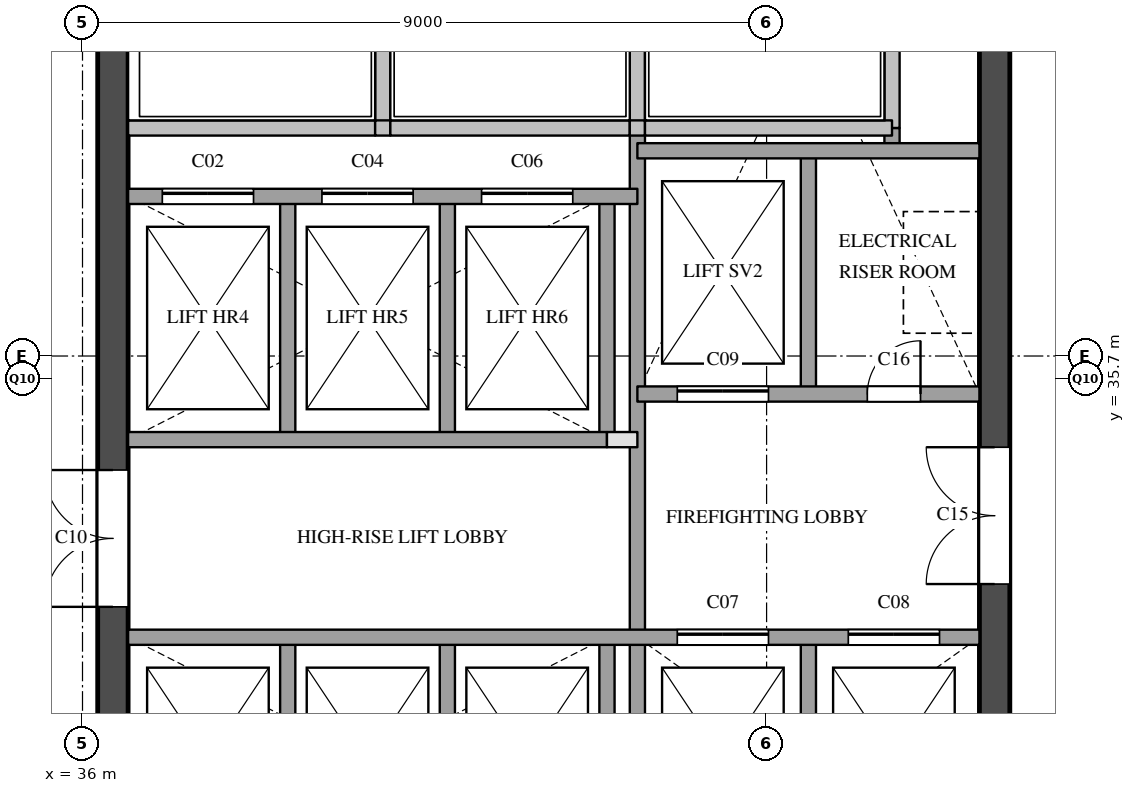
"""IFC4 building model, lengths in metres.
Left out: names, types, materials, properties, quantities, classifications, styles, units other than length and angle.
Written with IfcOpenShell. Run it as: python <this file> out.ifc"""

import sys

from ifc_helpers import new_model, si_unit, direction, frame, frame_2d, origin, place, context, subcontext, project, spatial, rectangle, extrude, element, fill, save


model = new_model("IFC4")
c1 = context("Model", 3, precision=1e-05, world=origin(), true_north=direction((0.0, 1.0)))
c2 = subcontext(c1, "Body", "Model", "MODEL_VIEW")
j1 = project(units=[si_unit("LENGTHUNIT", "METRE"), si_unit("PLANEANGLEUNIT", "RADIAN")], contexts=[c1])
p1 = place(None, origin())
s1 = spatial("IfcSite", under=j1, at=p1, CompositionType="ELEMENT")
p2 = place(p1, origin())
s2 = spatial("IfcBuilding", under=s1, at=p2, CompositionType="ELEMENT")
p3 = place(p2, frame((0.0, 0.0, 250.1)))
s3 = spatial("IfcBuildingStorey", under=s2, at=p3, CompositionType="ELEMENT", Elevation=250.1)
p4 = place(p3, frame((36.4, 29.1, 0.0), z_axis=(0.0, 0.0, 1.0), x_axis=(0.0, 1.0, 0.0)))
e1 = element("IfcWall", 1, at=p4, inside=s3, PredefinedType="SHEAR", context=c2, shape_type="SweptSolid", body=[
    extrude(rectangle(XDim=20.3, YDim=0.4, at=frame_2d((10.15, 0.0))), origin(), (0.0, 0.0, 1.0), 3.6),
])
p5 = place(p4, frame((3.6, 0.0, 0.0)))
e2 = element("IfcOpeningElement", 2, at=p5, cuts=e1, PredefinedType="OPENING", context=c2, shape_type="SweptSolid", body=[
    extrude(rectangle(XDim=1.8, YDim=2.1, at=frame_2d((0.9, 1.05))), frame((0.0, 0.21, 0.0), z_axis=(0.0, -1.0, 0.0), x_axis=(1.0, 0.0, 0.0)), (0.0, 0.0, 1.0), 0.42),
])
p6 = place(p4, frame((16.4, 0.0, 0.0)))
e3 = element("IfcOpeningElement", 3, at=p6, cuts=e1, PredefinedType="OPENING", context=c2, shape_type="SweptSolid", body=[
    extrude(rectangle(XDim=1.0, YDim=2.1, at=frame_2d((0.5, 1.05))), frame((0.0, 0.21, 0.0), z_axis=(0.0, -1.0, 0.0), x_axis=(1.0, 0.0, 0.0)), (0.0, 0.0, 1.0), 0.42),
])
p7 = place(p3, frame((48.0, 29.1, 0.0), z_axis=(0.0, 0.0, 1.0), x_axis=(0.0, 1.0, 0.0)))
e4 = element("IfcWall", 4, at=p7, inside=s3, PredefinedType="SHEAR", context=c2, shape_type="SweptSolid", body=[
    extrude(rectangle(XDim=20.3, YDim=0.4, at=frame_2d((10.15, 0.0))), origin(), (0.0, 0.0, 1.0), 3.6),
])
p8 = place(p7, frame((12.5, 0.0, 0.0)))
e5 = element("IfcOpeningElement", 5, at=p8, cuts=e4, PredefinedType="OPENING", context=c2, shape_type="SweptSolid", body=[
    extrude(rectangle(XDim=0.7, YDim=2.1, at=frame_2d((0.35, 1.05))), frame((0.0, 0.21, 0.0), z_axis=(0.0, -1.0, 0.0), x_axis=(1.0, 0.0, 0.0)), (0.0, 0.0, 1.0), 0.42),
])
p9 = place(p7, frame((3.9, 0.0, 0.0)))
e6 = element("IfcOpeningElement", 6, at=p9, cuts=e4, PredefinedType="OPENING", context=c2, shape_type="SweptSolid", body=[
    extrude(rectangle(XDim=1.8, YDim=2.1, at=frame_2d((0.9, 1.05))), frame((0.0, 0.21, 0.0), z_axis=(0.0, -1.0, 0.0), x_axis=(1.0, 0.0, 0.0)), (0.0, 0.0, 1.0), 0.42),
])
p10 = place(p3, frame((38.7, 29.1, 0.0), z_axis=(0.0, 0.0, 1.0), x_axis=(0.0, 1.0, 0.0)))
e7 = element("IfcWall", 7, at=p10, inside=s3, PredefinedType="SOLIDWALL", context=c2, shape_type="SweptSolid", body=[
    extrude(rectangle(XDim=3.2, YDim=0.2, at=frame_2d((1.6, 0.0))), origin(), (0.0, 0.0, 1.0), 3.6),
])
p11 = place(p3, frame((38.7, 34.9, 0.0), z_axis=(0.0, 0.0, 1.0), x_axis=(0.0, 1.0, 0.0)))
e8 = element("IfcWall", 8, at=p11, inside=s3, PredefinedType="SOLIDWALL", context=c2, shape_type="SweptSolid", body=[
    extrude(rectangle(XDim=3.2, YDim=0.2, at=frame_2d((1.6, 0.0))), origin(), (0.0, 0.0, 1.0), 3.6),
])
p12 = place(p3, frame((39.95, 39.0, 0.0), z_axis=(0.0, 0.0, 1.0), x_axis=(0.0, 1.0, 0.0)))
e9 = element("IfcWall", 9, at=p12, inside=s3, PredefinedType="SOLIDWALL", context=c2, shape_type="SweptSolid", body=[
    extrude(rectangle(XDim=1.78, YDim=0.2, at=frame_2d((0.89, 0.0))), origin(), (0.0, 0.0, 1.0), 3.6),
])
p13 = place(p3, frame((40.8, 29.1, 0.0), z_axis=(0.0, 0.0, 1.0), x_axis=(0.0, 1.0, 0.0)))
e10 = element("IfcWall", 10, at=p13, inside=s3, PredefinedType="SOLIDWALL", context=c2, shape_type="SweptSolid", body=[
    extrude(rectangle(XDim=3.2, YDim=0.2, at=frame_2d((1.6, 0.0))), origin(), (0.0, 0.0, 1.0), 3.6),
])
p14 = place(p3, frame((40.8, 34.9, 0.0), z_axis=(0.0, 0.0, 1.0), x_axis=(0.0, 1.0, 0.0)))
e11 = element("IfcWall", 11, at=p14, inside=s3, PredefinedType="SOLIDWALL", context=c2, shape_type="SweptSolid", body=[
    extrude(rectangle(XDim=3.2, YDim=0.2, at=frame_2d((1.6, 0.0))), origin(), (0.0, 0.0, 1.0), 3.6),
])
p15 = place(p3, frame((42.9, 29.1, 0.0), z_axis=(0.0, 0.0, 1.0), x_axis=(0.0, 1.0, 0.0)))
e12 = element("IfcWall", 12, at=p15, inside=s3, PredefinedType="SOLIDWALL", context=c2, shape_type="SweptSolid", body=[
    extrude(rectangle(XDim=3.2, YDim=0.2, at=frame_2d((1.6, 0.0))), origin(), (0.0, 0.0, 1.0), 3.6),
])
p16 = place(p3, frame((42.9, 34.9, 0.0), z_axis=(0.0, 0.0, 1.0), x_axis=(0.0, 1.0, 0.0)))
e13 = element("IfcWall", 13, at=p16, inside=s3, PredefinedType="SOLIDWALL", context=c2, shape_type="SweptSolid", body=[
    extrude(rectangle(XDim=3.2, YDim=0.2, at=frame_2d((1.6, 0.0))), origin(), (0.0, 0.0, 1.0), 3.6),
])
p17 = place(p3, frame((43.3, 29.1, 0.0), z_axis=(0.0, 0.0, 1.0), x_axis=(0.0, 1.0, 0.0)))
e14 = element("IfcWall", 14, at=p17, inside=s3, PredefinedType="SOLIDWALL", context=c2, shape_type="SweptSolid", body=[
    extrude(rectangle(XDim=9.9, YDim=0.2, at=frame_2d((4.95, 0.0))), origin(), (0.0, 0.0, 1.0), 3.6),
])
p18 = place(p3, frame((43.3, 39.0, 0.0), z_axis=(0.0, 0.0, 1.0), x_axis=(0.0, 1.0, 0.0)))
e15 = element("IfcWall", 15, at=p18, inside=s3, PredefinedType="SOLIDWALL", context=c2, shape_type="SweptSolid", body=[
    extrude(rectangle(XDim=1.78, YDim=0.2, at=frame_2d((0.89, 0.0))), origin(), (0.0, 0.0, 1.0), 3.6),
])
for number, where, z_axis, x_axis in (
    (16, (45.55, 29.1, 0.0), (0.0, 0.0, 1.0), (0.0, 1.0, 0.0)),
    (17, (45.55, 35.5, 0.0), (0.0, 0.0, 1.0), (0.0, 1.0, 0.0)),
):
    element("IfcWall", number, at=place(p3, frame(where, z_axis=z_axis, x_axis=x_axis)), inside=s3, PredefinedType="SOLIDWALL", context=c2, shape_type="SweptSolid", body=[
        extrude(rectangle(XDim=3.2, YDim=0.2, at=frame_2d((1.6, 0.0))), origin(), (0.0, 0.0, 1.0), 3.6),
    ])
p19 = place(p3, frame((46.65, 38.7, 0.0), z_axis=(0.0, 0.0, 1.0), x_axis=(0.0, 1.0, 0.0)))
e18 = element("IfcWall", 18, at=p19, inside=s3, PredefinedType="SOLIDWALL", context=c2, shape_type="SweptSolid", body=[
    extrude(rectangle(XDim=0.3, YDim=0.2, at=frame_2d((0.15, 0.0))), origin(), (0.0, 0.0, 1.0), 3.6),
])
p20 = place(p3, frame((46.65, 39.0, 0.0), z_axis=(0.0, 0.0, 1.0), x_axis=(0.0, 1.0, 0.0)))
e19 = element("IfcWall", 19, at=p20, inside=s3, PredefinedType="SOLIDWALL", context=c2, shape_type="SweptSolid", body=[
    extrude(rectangle(XDim=1.78, YDim=0.2, at=frame_2d((0.89, 0.0))), origin(), (0.0, 0.0, 1.0), 3.6),
])
p21 = place(p3, frame((36.6, 32.3, 0.0), z_axis=(0.0, 0.0, 1.0), x_axis=(1.0, 0.0, 0.0)))
e20 = element("IfcWall", 20, at=p21, inside=s3, PredefinedType="SOLIDWALL", context=c2, shape_type="SweptSolid", body=[
    extrude(rectangle(XDim=11.2, YDim=0.2, at=frame_2d((5.6, 0.0))), origin(), (0.0, 0.0, 1.0), 3.6),
])
p22 = place(p21, frame((7.225, 0.0, 0.0)))
e21 = element("IfcOpeningElement", 21, at=p22, cuts=e20, PredefinedType="OPENING", context=c2, shape_type="SweptSolid", body=[
    extrude(rectangle(XDim=1.2, YDim=2.1, at=frame_2d((0.6, 1.05))), frame((0.0, 0.11, 0.0), z_axis=(0.0, -1.0, 0.0), x_axis=(1.0, 0.0, 0.0)), (0.0, 0.0, 1.0), 0.22),
])
p23 = place(p21, frame((9.475, 0.0, 0.0)))
e22 = element("IfcOpeningElement", 22, at=p23, cuts=e20, PredefinedType="OPENING", context=c2, shape_type="SweptSolid", body=[
    extrude(rectangle(XDim=1.2, YDim=2.1, at=frame_2d((0.6, 1.05))), frame((0.0, 0.11, 0.0), z_axis=(0.0, -1.0, 0.0), x_axis=(1.0, 0.0, 0.0)), (0.0, 0.0, 1.0), 0.22),
])
p24 = place(p3, frame((42.9, 34.9, 0.0), z_axis=(0.0, 0.0, 1.0), x_axis=(1.0, 0.0, 0.0)))
e23 = element("IfcWall", 23, at=p24, inside=s3, PredefinedType="PARTITIONING", context=c2, shape_type="SweptSolid", body=[
    extrude(rectangle(XDim=0.4, YDim=0.2, at=frame_2d((0.2, 0.0))), origin(), (0.0, 0.0, 1.0), 3.6),
])
p25 = place(p3, frame((36.6, 34.9, 0.0), z_axis=(0.0, 0.0, 1.0), x_axis=(1.0, 0.0, 0.0)))
e24 = element("IfcWall", 24, at=p25, inside=s3, PredefinedType="SOLIDWALL", context=c2, shape_type="SweptSolid", body=[
    extrude(rectangle(XDim=6.3, YDim=0.2, at=frame_2d((3.15, 0.0))), origin(), (0.0, 0.0, 1.0), 3.6),
])
p26 = place(p3, frame((43.3, 35.5, 0.0), z_axis=(0.0, 0.0, 1.0), x_axis=(1.0, 0.0, 0.0)))
e25 = element("IfcWall", 25, at=p26, inside=s3, PredefinedType="SOLIDWALL", context=c2, shape_type="SweptSolid", body=[
    extrude(rectangle(XDim=4.5, YDim=0.2, at=frame_2d((2.25, 0.0))), origin(), (0.0, 0.0, 1.0), 3.6),
])
p27 = place(p26, frame((0.525, 0.0, 0.0)))
e26 = element("IfcOpeningElement", 26, at=p27, cuts=e25, PredefinedType="OPENING", context=c2, shape_type="SweptSolid", body=[
    extrude(rectangle(XDim=1.2, YDim=2.1, at=frame_2d((0.6, 1.05))), frame((0.0, 0.11, 0.0), z_axis=(0.0, -1.0, 0.0), x_axis=(1.0, 0.0, 0.0)), (0.0, 0.0, 1.0), 0.22),
])
p28 = place(p26, frame((3.025, 0.0, 0.0)))
e27 = element("IfcOpeningElement", 27, at=p28, cuts=e25, PredefinedType="OPENING", context=c2, shape_type="SweptSolid", body=[
    extrude(rectangle(XDim=0.7, YDim=2.1, at=frame_2d((0.35, 1.05))), frame((0.0, 0.11, 0.0), z_axis=(0.0, -1.0, 0.0), x_axis=(1.0, 0.0, 0.0)), (0.0, 0.0, 1.0), 0.22),
])
p29 = place(p3, frame((36.6, 38.1, 0.0), z_axis=(0.0, 0.0, 1.0), x_axis=(1.0, 0.0, 0.0)))
e28 = element("IfcWall", 28, at=p29, inside=s3, PredefinedType="SOLIDWALL", context=c2, shape_type="SweptSolid", body=[
    extrude(rectangle(XDim=6.7, YDim=0.2, at=frame_2d((3.35, 0.0))), origin(), (0.0, 0.0, 1.0), 3.6),
])
p30 = place(p29, frame((0.45, 0.0, 0.0)))
e29 = element("IfcOpeningElement", 29, at=p30, cuts=e28, PredefinedType="OPENING", context=c2, shape_type="SweptSolid", body=[
    extrude(rectangle(XDim=1.2, YDim=2.1, at=frame_2d((0.6, 1.05))), frame((0.0, 0.11, 0.0), z_axis=(0.0, -1.0, 0.0), x_axis=(1.0, 0.0, 0.0)), (0.0, 0.0, 1.0), 0.22),
])
p31 = place(p29, frame((2.55, 0.0, 0.0)))
e30 = element("IfcOpeningElement", 30, at=p31, cuts=e28, PredefinedType="OPENING", context=c2, shape_type="SweptSolid", body=[
    extrude(rectangle(XDim=1.2, YDim=2.1, at=frame_2d((0.6, 1.05))), frame((0.0, 0.11, 0.0), z_axis=(0.0, -1.0, 0.0), x_axis=(1.0, 0.0, 0.0)), (0.0, 0.0, 1.0), 0.22),
])
p32 = place(p29, frame((4.65, 0.0, 0.0)))
e31 = element("IfcOpeningElement", 31, at=p32, cuts=e28, PredefinedType="OPENING", context=c2, shape_type="SweptSolid", body=[
    extrude(rectangle(XDim=1.2, YDim=2.1, at=frame_2d((0.6, 1.05))), frame((0.0, 0.11, 0.0), z_axis=(0.0, -1.0, 0.0), x_axis=(1.0, 0.0, 0.0)), (0.0, 0.0, 1.0), 0.22),
])
p33 = place(p3, frame((43.3, 38.7, 0.0), z_axis=(0.0, 0.0, 1.0), x_axis=(1.0, 0.0, 0.0)))
e32 = element("IfcWall", 32, at=p33, inside=s3, PredefinedType="SOLIDWALL", context=c2, shape_type="SweptSolid", body=[
    extrude(rectangle(XDim=4.5, YDim=0.2, at=frame_2d((2.25, 0.0))), origin(), (0.0, 0.0, 1.0), 3.6),
])
p34 = place(p3, frame((36.6, 39.0, 0.0), z_axis=(0.0, 0.0, 1.0), x_axis=(1.0, 0.0, 0.0)))
e33 = element("IfcWall", 33, at=p34, inside=s3, PredefinedType="SOLIDWALL", context=c2, shape_type="SweptSolid", body=[
    extrude(rectangle(XDim=3.25, YDim=0.2, at=frame_2d((1.625, 0.0))), origin(), (0.0, 0.0, 1.0), 3.6),
])
p35 = place(p3, frame((39.85, 39.0, 0.0), z_axis=(0.0, 0.0, 1.0), x_axis=(1.0, 0.0, 0.0)))
e34 = element("IfcWall", 34, at=p35, inside=s3, PredefinedType="SOLIDWALL", context=c2, shape_type="SweptSolid", body=[
    extrude(rectangle(XDim=0.2, YDim=0.2, at=frame_2d((0.1, 0.0))), origin(), (0.0, 0.0, 1.0), 3.6),
])
p36 = place(p3, frame((40.05, 39.0, 0.0), z_axis=(0.0, 0.0, 1.0), x_axis=(1.0, 0.0, 0.0)))
e35 = element("IfcWall", 35, at=p36, inside=s3, PredefinedType="SOLIDWALL", context=c2, shape_type="SweptSolid", body=[
    extrude(rectangle(XDim=3.15, YDim=0.2, at=frame_2d((1.575, 0.0))), origin(), (0.0, 0.0, 1.0), 3.6),
])
p37 = place(p3, frame((43.2, 39.0, 0.0), z_axis=(0.0, 0.0, 1.0), x_axis=(1.0, 0.0, 0.0)))
e36 = element("IfcWall", 36, at=p37, inside=s3, PredefinedType="SOLIDWALL", context=c2, shape_type="SweptSolid", body=[
    extrude(rectangle(XDim=0.2, YDim=0.2, at=frame_2d((0.1, 0.0))), origin(), (0.0, 0.0, 1.0), 3.6),
])
p38 = place(p3, frame((43.4, 39.0, 0.0), z_axis=(0.0, 0.0, 1.0), x_axis=(1.0, 0.0, 0.0)))
e37 = element("IfcWall", 37, at=p38, inside=s3, PredefinedType="SOLIDWALL", context=c2, shape_type="SweptSolid", body=[
    extrude(rectangle(XDim=3.25, YDim=0.2, at=frame_2d((1.625, 0.0))), origin(), (0.0, 0.0, 1.0), 3.6),
])
p39 = place(p30, origin())
e38 = element("IfcDoor", 38, at=p39, inside=s3, OperationType="SLIDING_TO_LEFT", PredefinedType="DOOR", context=c2, shape_type="SweptSolid", body=[
    extrude(rectangle(XDim=1.2, YDim=2.1, at=frame_2d((0.6, 1.05))), frame((0.0, 0.025, 0.0), z_axis=(0.0, -1.0, 0.0), x_axis=(1.0, 0.0, 0.0)), (0.0, 0.0, 1.0), 0.05),
])
fill(e29, e38)
p40 = place(p31, origin())
e39 = element("IfcDoor", 39, at=p40, inside=s3, OperationType="SLIDING_TO_LEFT", PredefinedType="DOOR", context=c2, shape_type="SweptSolid", body=[
    extrude(rectangle(XDim=1.2, YDim=2.1, at=frame_2d((0.6, 1.05))), frame((0.0, 0.025, 0.0), z_axis=(0.0, -1.0, 0.0), x_axis=(1.0, 0.0, 0.0)), (0.0, 0.0, 1.0), 0.05),
])
fill(e30, e39)
p41 = place(p32, origin())
e40 = element("IfcDoor", 40, at=p41, inside=s3, OperationType="SLIDING_TO_LEFT", PredefinedType="DOOR", context=c2, shape_type="SweptSolid", body=[
    extrude(rectangle(XDim=1.2, YDim=2.1, at=frame_2d((0.6, 1.05))), frame((0.0, 0.025, 0.0), z_axis=(0.0, -1.0, 0.0), x_axis=(1.0, 0.0, 0.0)), (0.0, 0.0, 1.0), 0.05),
])
fill(e31, e40)
p42 = place(p22, origin())
e41 = element("IfcDoor", 41, at=p42, inside=s3, OperationType="SLIDING_TO_LEFT", PredefinedType="DOOR", context=c2, shape_type="SweptSolid", body=[
    extrude(rectangle(XDim=1.2, YDim=2.1, at=frame_2d((0.6, 1.05))), frame((0.0, 0.025, 0.0), z_axis=(0.0, -1.0, 0.0), x_axis=(1.0, 0.0, 0.0)), (0.0, 0.0, 1.0), 0.05),
])
fill(e21, e41)
p43 = place(p23, origin())
e42 = element("IfcDoor", 42, at=p43, inside=s3, OperationType="SLIDING_TO_LEFT", PredefinedType="DOOR", context=c2, shape_type="SweptSolid", body=[
    extrude(rectangle(XDim=1.2, YDim=2.1, at=frame_2d((0.6, 1.05))), frame((0.0, 0.025, 0.0), z_axis=(0.0, -1.0, 0.0), x_axis=(1.0, 0.0, 0.0)), (0.0, 0.0, 1.0), 0.05),
])
fill(e22, e42)
p44 = place(p27, origin())
e43 = element("IfcDoor", 43, at=p44, inside=s3, OperationType="SLIDING_TO_LEFT", PredefinedType="DOOR", context=c2, shape_type="SweptSolid", body=[
    extrude(rectangle(XDim=1.2, YDim=2.1, at=frame_2d((0.6, 1.05))), frame((0.0, 0.025, 0.0), z_axis=(0.0, -1.0, 0.0), x_axis=(1.0, 0.0, 0.0)), (0.0, 0.0, 1.0), 0.05),
])
fill(e26, e43)
p45 = place(p5, origin())
e44 = element("IfcDoor", 44, at=p45, inside=s3, OperationType="DOUBLE_DOOR_SINGLE_SWING", PredefinedType="DOOR", context=c2, shape_type="SweptSolid", body=[
    extrude(rectangle(XDim=1.8, YDim=2.1, at=frame_2d((0.9, 1.05))), frame((0.0, 0.025, 0.0), z_axis=(0.0, -1.0, 0.0), x_axis=(1.0, 0.0, 0.0)), (0.0, 0.0, 1.0), 0.05),
])
fill(e2, e44)
p46 = place(p9, origin())
e45 = element("IfcDoor", 45, at=p46, inside=s3, OperationType="DOUBLE_DOOR_SINGLE_SWING", PredefinedType="DOOR", context=c2, shape_type="SweptSolid", body=[
    extrude(rectangle(XDim=1.8, YDim=2.1, at=frame_2d((0.9, 1.05))), frame((0.0, 0.025, 0.0), z_axis=(0.0, -1.0, 0.0), x_axis=(1.0, 0.0, 0.0)), (0.0, 0.0, 1.0), 0.05),
])
fill(e6, e45)
p47 = place(p28, origin())
e46 = element("IfcDoor", 46, at=p47, inside=s3, OperationType="SINGLE_SWING_RIGHT", PredefinedType="DOOR", context=c2, shape_type="SweptSolid", body=[
    extrude(rectangle(XDim=0.7, YDim=2.1, at=frame_2d((0.35, 1.05))), frame((0.0, 0.025, 0.0), z_axis=(0.0, -1.0, 0.0), x_axis=(1.0, 0.0, 0.0)), (0.0, 0.0, 1.0), 0.05),
])
fill(e27, e46)
save(model, sys.argv[1])
